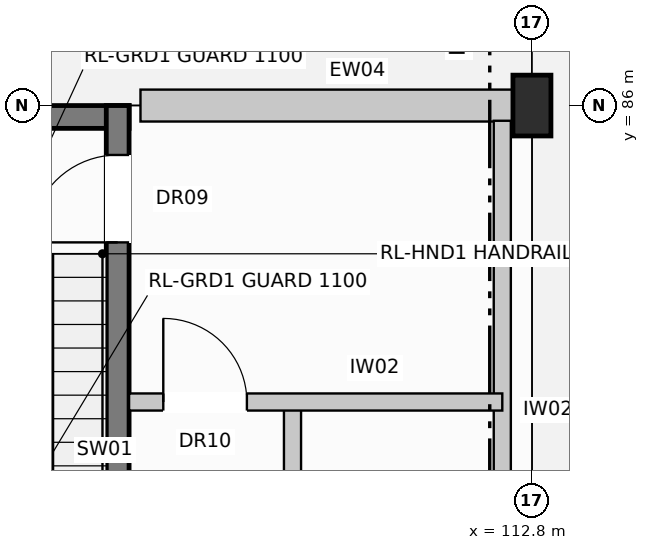
"""IFC4 building model, lengths in metres.
Left out: names, types, materials, properties, quantities, classifications, styles, units other than length and angle.
Written with IfcOpenShell. Run it as: python <this file> out.ifc"""

import sys

from ifc_helpers import new_model, si_unit, direction, frame, frame_2d, origin, origin_with_axes, origin_2d, place, context, subcontext, project, spatial, rectangle, extrude, element, fill, save


model = new_model("IFC4")
c1 = context("Model", 3, precision=1e-05, world=origin(), true_north=direction((0.0, 1.0)))
c2 = subcontext(c1, "Body", "Model", "MODEL_VIEW")
j1 = project(units=[si_unit("LENGTHUNIT", "METRE"), si_unit("PLANEANGLEUNIT", "RADIAN")], contexts=[c1])
p1 = place(None, origin())
s1 = spatial("IfcSite", under=j1, at=p1, CompositionType="ELEMENT")
p2 = place(p1, origin())
s2 = spatial("IfcBuilding", under=s1, at=p2, CompositionType="ELEMENT")
p3 = place(p2, origin())
s3 = spatial("IfcBuildingStorey", under=s2, at=p3, CompositionType="ELEMENT", Elevation=0.0)
p4 = place(p3, frame((112.8, 86.0, 0.0), z_axis=(0.0, 0.0, 1.0), x_axis=(1.0, 0.0, 0.0)))
e1 = element("IfcColumn", 1, at=p4, inside=s3, PredefinedType="COLUMN", context=c2, shape_type="SweptSolid", body=[
    extrude(rectangle(XDim=0.5, YDim=0.8, at=origin_2d()), origin(), (0.0, 0.0, 1.0), 4.4),
])
p5 = place(p3, frame((107.65, 86.0, 0.0), z_axis=(0.0, 0.0, 1.0), x_axis=(1.0, 0.0, 0.0)))
e2 = element("IfcWall", 2, at=p5, inside=s3, PredefinedType="STANDARD", context=c2, shape_type="SweptSolid", body=[
    extrude(rectangle(XDim=5.15, YDim=0.42, at=frame_2d((2.575, 0.0))), origin(), (0.0, 0.0, 1.0), 3.21),
])
p6 = place(p3, frame((103.9, 85.85, 0.0), z_axis=(0.0, 0.0, 1.0), x_axis=(1.0, 0.0, 0.0)))
e3 = element("IfcWall", 3, at=p6, inside=s3, PredefinedType="SHEAR", context=c2, shape_type="SweptSolid", body=[
    extrude(rectangle(XDim=3.6, YDim=0.3, at=frame_2d((1.8, 0.0))), origin(), (0.0, 0.0, 1.0), 4.12),
])
p7 = place(p6, frame((1.1, 0.0, 0.0)))
e4 = element("IfcOpeningElement", 4, at=p7, cuts=e3, PredefinedType="OPENING", context=c2, shape_type="SweptSolid", body=[
    extrude(rectangle(XDim=1.4, YDim=2.25, at=frame_2d((0.7, 1.125))), frame((0.0, 0.162, 0.0), z_axis=(0.0, -1.0, 0.0), x_axis=(1.0, 0.0, 0.0)), (0.0, 0.0, 1.0), 0.324),
])
p8 = place(p3, frame((107.35, 78.5, 0.0), z_axis=(0.0, 0.0, 1.0), x_axis=(0.0, 1.0, 0.0)))
e5 = element("IfcWall", 5, at=p8, inside=s3, PredefinedType="SHEAR", context=c2, shape_type="SweptSolid", body=[
    extrude(rectangle(XDim=7.5, YDim=0.3, at=frame_2d((3.75, 0.0))), origin(), (0.0, 0.0, 1.0), 4.12),
])
p9 = place(p8, frame((5.7, 0.0, 0.0)))
e6 = element("IfcOpeningElement", 6, at=p9, cuts=e5, PredefinedType="OPENING", context=c2, shape_type="SweptSolid", body=[
    extrude(rectangle(XDim=1.15, YDim=2.15, at=frame_2d((0.575, 1.075))), frame((0.0, 0.162, 0.0), z_axis=(0.0, -1.0, 0.0), x_axis=(1.0, 0.0, 0.0)), (0.0, 0.0, 1.0), 0.324),
])
p10 = place(p3, frame((112.41, 78.2, 0.0), z_axis=(0.0, 0.0, 1.0), x_axis=(0.0, 1.0, 0.0)))
e7 = element("IfcWall", 7, at=p10, inside=s3, PredefinedType="PARTITIONING", context=c2, shape_type="SweptSolid", body=[
    extrude(rectangle(XDim=7.6, YDim=0.225, at=frame_2d((3.8, 0.0))), origin(), (0.0, 0.0, 1.0), 3.36),
])
p11 = place(p3, frame((109.65, 78.2, 0.0), z_axis=(0.0, 0.0, 1.0), x_axis=(0.0, 1.0, 0.0)))
e8 = element("IfcWall", 8, at=p11, inside=s3, PredefinedType="PARTITIONING", context=c2, shape_type="SweptSolid", body=[
    extrude(rectangle(XDim=3.8, YDim=0.225, at=frame_2d((1.9, 0.0))), origin(), (0.0, 0.0, 1.0), 4.12),
])
p12 = place(p3, frame((107.5, 82.1, 0.0), z_axis=(0.0, 0.0, 1.0), x_axis=(1.0, 0.0, 0.0)))
e9 = element("IfcWall", 9, at=p12, inside=s3, PredefinedType="PARTITIONING", context=c2, shape_type="SweptSolid", body=[
    extrude(rectangle(XDim=4.91, YDim=0.225, at=frame_2d((2.455, 0.0))), origin(), (0.0, 0.0, 1.0), 4.12),
])
p13 = place(p12, frame((0.45, 0.0, 0.0)))
e10 = element("IfcOpeningElement", 10, at=p13, cuts=e9, PredefinedType="OPENING", context=c2, shape_type="SweptSolid", body=[
    extrude(rectangle(XDim=1.1, YDim=2.15, at=frame_2d((0.55, 1.075))), frame((0.0, 0.125, 0.0), z_axis=(0.0, -1.0, 0.0), x_axis=(1.0, 0.0, 0.0)), (0.0, 0.0, 1.0), 0.249),
])
p14 = place(p9, origin_with_axes())
e11 = element("IfcDoor", 11, at=p14, inside=s3, OperationType="SINGLE_SWING_LEFT", PredefinedType="DOOR", context=c2, shape_type="SweptSolid", body=[
    extrude(rectangle(XDim=1.15, YDim=2.15, at=frame_2d((0.575, 1.075))), frame((0.0, 0.025, 0.0), z_axis=(0.0, -1.0, 0.0), x_axis=(1.0, 0.0, 0.0)), (0.0, 0.0, 1.0), 0.05),
])
fill(e6, e11)
p15 = place(p13, origin_with_axes())
e12 = element("IfcDoor", 12, at=p15, inside=s3, OperationType="SINGLE_SWING_LEFT", PredefinedType="DOOR", context=c2, shape_type="SweptSolid", body=[
    extrude(rectangle(XDim=1.1, YDim=2.15, at=frame_2d((0.55, 1.075))), frame((0.0, 0.025, 0.0), z_axis=(0.0, -1.0, 0.0), x_axis=(1.0, 0.0, 0.0)), (0.0, 0.0, 1.0), 0.05),
])
fill(e10, e12)
save(model, sys.argv[1])
